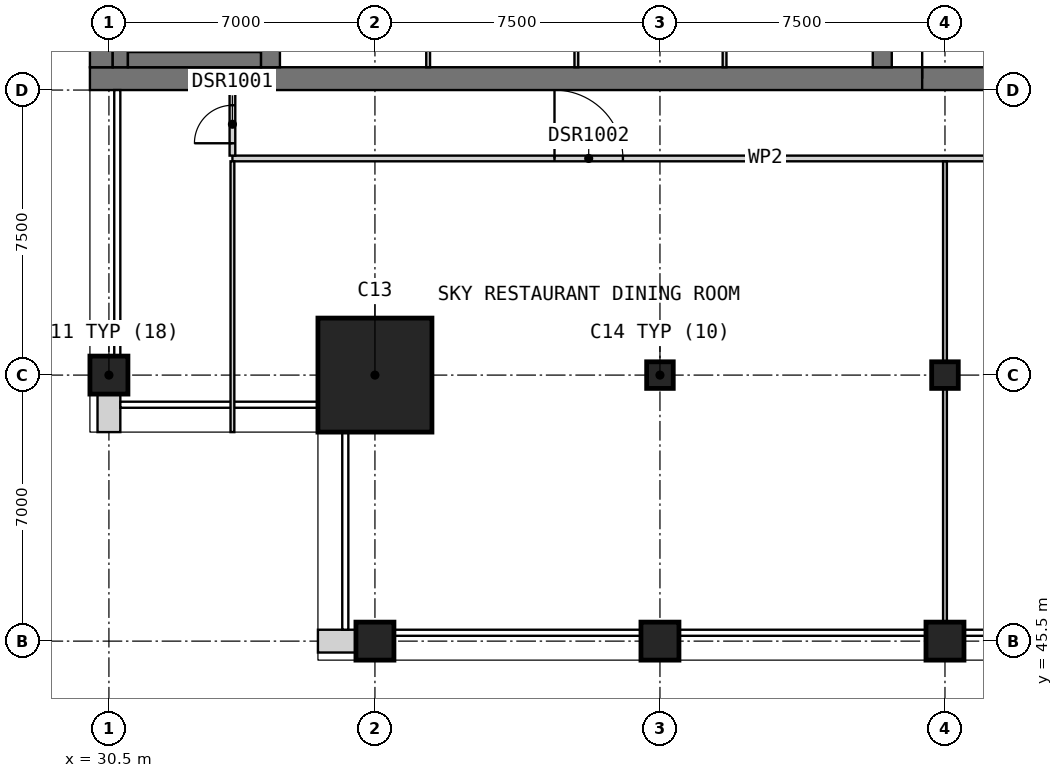
"""IFC4 building model, lengths in metres.
Left out: names, types, materials, properties, quantities, classifications, styles, units other than length and angle.
Written with IfcOpenShell. Run it as: python <this file> out.ifc"""

import sys

from ifc_helpers import new_model, si_unit, direction, frame, frame_2d, origin, origin_2d, place, context, subcontext, project, spatial, rectangle, extrude, element, fill, save


model = new_model("IFC4")
c1 = context("Model", 3, precision=1e-05, world=origin(), true_north=direction((0.0, 1.0)))
c2 = subcontext(c1, "Body", "Model", "MODEL_VIEW")
j1 = project(units=[si_unit("LENGTHUNIT", "METRE"), si_unit("PLANEANGLEUNIT", "RADIAN")], contexts=[c1])
p1 = place(None, origin())
s1 = spatial("IfcSite", under=j1, at=p1, CompositionType="ELEMENT")
p2 = place(p1, origin())
s2 = spatial("IfcBuilding", under=s1, at=p2, CompositionType="ELEMENT")
p3 = place(p2, frame((0.0, 0.0, 292.2)))
s3 = spatial("IfcBuildingStorey", under=s2, at=p3, CompositionType="ELEMENT", Elevation=292.2)
for number, where, z_axis, x_axis in (
    (1, (30.5, 52.5, 0.0), (0.0, 0.0, 1.0), (1.0, 0.0, 0.0)),
    (2, (37.5, 45.5, 0.0), (0.0, 0.0, 1.0), (1.0, 0.0, 0.0)),
    (3, (45.0, 45.5, 0.0), (0.0, 0.0, 1.0), (1.0, 0.0, 0.0)),
):
    element("IfcColumn", number, at=place(p3, frame(where, z_axis=z_axis, x_axis=x_axis)), inside=s3, PredefinedType="COLUMN", context=c2, shape_type="SweptSolid", body=[
        extrude(rectangle(XDim=1.0, YDim=1.0, at=origin_2d()), origin(), (0.0, 0.0, 1.0), 5.5),
    ])
p4 = place(p3, frame((45.0, 52.5, 0.0), z_axis=(0.0, 0.0, 1.0), x_axis=(1.0, 0.0, 0.0)))
e4 = element("IfcColumn", 4, at=p4, inside=s3, PredefinedType="COLUMN", context=c2, shape_type="SweptSolid", body=[
    extrude(rectangle(XDim=0.7, YDim=0.7, at=origin_2d()), origin(), (0.0, 0.0, 1.0), 5.5),
])
p5 = place(p3, frame((52.5, 45.5, 0.0), z_axis=(0.0, 0.0, 1.0), x_axis=(1.0, 0.0, 0.0)))
e5 = element("IfcColumn", 5, at=p5, inside=s3, PredefinedType="COLUMN", context=c2, shape_type="SweptSolid", body=[
    extrude(rectangle(XDim=1.0, YDim=1.0, at=origin_2d()), origin(), (0.0, 0.0, 1.0), 5.5),
])
p6 = place(p3, frame((52.5, 52.5, 0.0), z_axis=(0.0, 0.0, 1.0), x_axis=(1.0, 0.0, 0.0)))
e6 = element("IfcColumn", 6, at=p6, inside=s3, PredefinedType="COLUMN", context=c2, shape_type="SweptSolid", body=[
    extrude(rectangle(XDim=0.7, YDim=0.7, at=origin_2d()), origin(), (0.0, 0.0, 1.0), 5.5),
])
p7 = place(p3, frame((37.5, 52.5, 0.0), z_axis=(0.0, 0.0, 1.0), x_axis=(1.0, 0.0, 0.0)))
e7 = element("IfcColumn", 7, at=p7, inside=s3, PredefinedType="COLUMN", context=c2, shape_type="SweptSolid", body=[
    extrude(rectangle(XDim=3.0, YDim=3.0, at=origin_2d()), origin(), (0.0, 0.0, 1.0), 5.5),
])
p8 = place(p3, frame((30.0, 60.3, 0.0), z_axis=(0.0, 0.0, 1.0), x_axis=(1.0, 0.0, 0.0)))
e8 = element("IfcWall", 8, at=p8, inside=s3, PredefinedType="SHEAR", context=c2, shape_type="SweptSolid", body=[
    extrude(rectangle(XDim=30.0, YDim=0.6, at=frame_2d((15.0, 0.0))), origin(), (0.0, 0.0, 1.0), 5.5),
])
p9 = place(p8, frame((21.9, 0.0, 0.0)))
e9 = element("IfcOpeningElement", 9, at=p9, cuts=e8, PredefinedType="OPENING", context=c2, shape_type="SweptSolid", body=[
    extrude(rectangle(XDim=1.8, YDim=2.1, at=frame_2d((0.9, 1.05))), frame((0.0, 0.31, 0.0), z_axis=(0.0, -1.0, 0.0), x_axis=(1.0, 0.0, 0.0)), (0.0, 0.0, 1.0), 0.62),
])
p10 = place(p8, frame((26.5, 0.0, 0.0)))
e10 = element("IfcOpeningElement", 10, at=p10, cuts=e8, PredefinedType="OPENING", context=c2, shape_type="SweptSolid", body=[
    extrude(rectangle(XDim=1.2, YDim=2.1, at=frame_2d((0.6, 1.05))), frame((0.0, 0.31, 0.0), z_axis=(0.0, -1.0, 0.0), x_axis=(1.0, 0.0, 0.0)), (0.0, 0.0, 1.0), 0.62),
])
p11 = place(p3, frame((30.3, 60.6, 0.0), z_axis=(0.0, 0.0, 1.0), x_axis=(0.0, 1.0, 0.0)))
e11 = element("IfcWall", 11, at=p11, inside=s3, PredefinedType="SHEAR", context=c2, shape_type="SweptSolid", body=[
    extrude(rectangle(XDim=21.3, YDim=0.6, at=frame_2d((10.65, 0.0))), origin(), (0.0, 0.0, 1.0), 5.5),
])
for number, where, z_axis, x_axis in (
    (12, (34.75, 60.6, 0.0), (0.0, 0.0, 1.0), (0.0, 1.0, 0.0)),
    (13, (50.85, 60.6, 0.0), (0.0, 0.0, 1.0), (0.0, 1.0, 0.0)),
):
    element("IfcWall", number, at=place(p3, frame(where, z_axis=z_axis, x_axis=x_axis)), inside=s3, PredefinedType="SHEAR", context=c2, shape_type="SweptSolid", body=[
        extrude(rectangle(XDim=3.6, YDim=0.5, at=frame_2d((1.8, 0.0))), origin(), (0.0, 0.0, 1.0), 5.5),
    ])
for number, where, z_axis, x_axis in (
    (14, (36.0, 45.5, 0.0), (0.0, 0.0, 1.0), (1.0, 0.0, 0.0)),
    (15, (30.5, 52.0, 0.0), (0.0, 0.0, 1.0), (0.0, -1.0, 0.0)),
):
    element("IfcWall", number, at=place(p3, frame(where, z_axis=z_axis, x_axis=x_axis)), inside=s3, PredefinedType="SOLIDWALL", context=c2, shape_type="SweptSolid", body=[
        extrude(rectangle(XDim=1.0, YDim=0.6, at=frame_2d((0.5, 0.0))), origin(), (0.0, 0.0, 1.0), 5.2),
    ])
for number, where, z_axis, x_axis in (
    (16, (38.9, 60.6, 0.0), (0.0, 0.0, 1.0), (0.0, 1.0, 0.0)),
    (17, (42.8, 60.6, 0.0), (0.0, 0.0, 1.0), (0.0, 1.0, 0.0)),
    (18, (46.7, 60.6, 0.0), (0.0, 0.0, 1.0), (0.0, 1.0, 0.0)),
):
    element("IfcWall", number, at=place(p3, frame(where, z_axis=z_axis, x_axis=x_axis)), inside=s3, PredefinedType="PARTITIONING", context=c2, shape_type="SweptSolid", body=[
        extrude(rectangle(XDim=3.4, YDim=0.1, at=frame_2d((1.7, 0.0))), origin(), (0.0, 0.0, 1.0), 5.2),
    ])
p12 = place(p3, frame((30.8, 60.6, 0.0), z_axis=(0.0, 0.0, 1.0), x_axis=(0.0, 1.0, 0.0)))
e19 = element("IfcWall", 19, at=p12, inside=s3, PredefinedType="SOLIDWALL", context=c2, shape_type="SweptSolid", body=[
    extrude(rectangle(XDim=21.3, YDim=0.4, at=frame_2d((10.65, 0.0))), origin(), (0.0, 0.0, 1.0), 5.2),
])
p13 = place(p3, frame((31.0, 60.8, 0.0), z_axis=(0.0, 0.0, 1.0), x_axis=(1.0, 0.0, 0.0)))
e20 = element("IfcWall", 20, at=p13, inside=s3, PredefinedType="SOLIDWALL", context=c2, shape_type="SweptSolid", body=[
    extrude(rectangle(XDim=3.5, YDim=0.4, at=frame_2d((1.75, 0.0))), origin(), (0.0, 0.0, 1.0), 5.2),
])
p14 = place(p3, frame((33.75, 58.2, 0.0), z_axis=(0.0, 0.0, 1.0), x_axis=(1.0, 0.0, 0.0)))
e21 = element("IfcWall", 21, at=p14, inside=s3, PredefinedType="PARTITIONING", context=c2, shape_type="SweptSolid", body=[
    extrude(rectangle(XDim=28.05, YDim=0.15, at=frame_2d((14.025, 0.0))), origin(), (0.0, 0.0, 1.0), 5.2),
])
p15 = place(p14, frame((8.475, 0.0, 0.0)))
e22 = element("IfcOpeningElement", 22, at=p15, cuts=e21, PredefinedType="OPENING", context=c2, shape_type="SweptSolid", body=[
    extrude(rectangle(XDim=1.8, YDim=2.1, at=frame_2d((0.9, 1.05))), frame((0.0, 0.085, 0.0), z_axis=(0.0, -1.0, 0.0), x_axis=(1.0, 0.0, 0.0)), (0.0, 0.0, 1.0), 0.17),
])
p16 = place(p14, frame((22.0, 0.0, 0.0)))
e23 = element("IfcOpeningElement", 23, at=p16, cuts=e21, PredefinedType="OPENING", context=c2, shape_type="SweptSolid", body=[
    extrude(rectangle(XDim=1.0, YDim=2.1, at=frame_2d((0.5, 1.05))), frame((0.0, 0.085, 0.0), z_axis=(0.0, -1.0, 0.0), x_axis=(1.0, 0.0, 0.0)), (0.0, 0.0, 1.0), 0.17),
])
p17 = place(p14, frame((26.65, 0.0, 0.0)))
e24 = element("IfcOpeningElement", 24, at=p17, cuts=e21, PredefinedType="OPENING", context=c2, shape_type="SweptSolid", body=[
    extrude(rectangle(XDim=1.0, YDim=2.1, at=frame_2d((0.5, 1.05))), frame((0.0, 0.085, 0.0), z_axis=(0.0, -1.0, 0.0), x_axis=(1.0, 0.0, 0.0)), (0.0, 0.0, 1.0), 0.17),
])
p18 = place(p3, frame((33.75, 58.275, 0.0), z_axis=(0.0, 0.0, 1.0), x_axis=(0.0, 1.0, 0.0)))
e25 = element("IfcWall", 25, at=p18, inside=s3, PredefinedType="PARTITIONING", context=c2, shape_type="SweptSolid", body=[
    extrude(rectangle(XDim=1.725, YDim=0.15, at=frame_2d((0.863, 0.0))), origin(), (0.0, 0.0, 1.0), 5.2),
])
p19 = place(p18, frame((0.325, 0.0, 0.0)))
e26 = element("IfcOpeningElement", 26, at=p19, cuts=e25, PredefinedType="OPENING", context=c2, shape_type="SweptSolid", body=[
    extrude(rectangle(XDim=1.0, YDim=2.1, at=frame_2d((0.5, 1.05))), frame((0.0, 0.085, 0.0), z_axis=(0.0, -1.0, 0.0), x_axis=(1.0, 0.0, 0.0)), (0.0, 0.0, 1.0), 0.17),
])
p20 = place(p3, frame((33.75, 51.0, 0.0), z_axis=(0.0, 0.0, 1.0), x_axis=(0.0, 1.0, 0.0)))
e27 = element("IfcWall", 27, at=p20, inside=s3, PredefinedType="PARTITIONING", context=c2, shape_type="SweptSolid", body=[
    extrude(rectangle(XDim=7.125, YDim=0.1, at=frame_2d((3.562, 0.0))), origin(), (0.0, 0.0, 1.0), 5.2),
])
p21 = place(p3, frame((52.5, 45.0, 0.0), z_axis=(0.0, 0.0, 1.0), x_axis=(0.0, 1.0, 0.0)))
e28 = element("IfcWall", 28, at=p21, inside=s3, PredefinedType="PARTITIONING", context=c2, shape_type="SweptSolid", body=[
    extrude(rectangle(XDim=13.125, YDim=0.1, at=frame_2d((6.562, 0.0))), origin(), (0.0, 0.0, 1.0), 5.2),
])
p22 = place(p9, origin())
e29 = element("IfcDoor", 29, at=p22, inside=s3, OperationType="DOUBLE_DOOR_SINGLE_SWING", PredefinedType="DOOR", context=c2, shape_type="SweptSolid", body=[
    extrude(rectangle(XDim=1.8, YDim=2.1, at=frame_2d((0.9, 1.05))), frame((0.0, 0.025, 0.0), z_axis=(0.0, -1.0, 0.0), x_axis=(1.0, 0.0, 0.0)), (0.0, 0.0, 1.0), 0.05),
])
fill(e9, e29)
p23 = place(p19, origin())
e30 = element("IfcDoor", 30, at=p23, inside=s3, OperationType="SINGLE_SWING_RIGHT", PredefinedType="DOOR", context=c2, shape_type="SweptSolid", body=[
    extrude(rectangle(XDim=1.0, YDim=2.1, at=frame_2d((0.5, 1.05))), frame((0.0, 0.025, 0.0), z_axis=(0.0, -1.0, 0.0), x_axis=(1.0, 0.0, 0.0)), (0.0, 0.0, 1.0), 0.05),
])
fill(e26, e30)
p24 = place(p15, origin())
e31 = element("IfcDoor", 31, at=p24, inside=s3, OperationType="DOUBLE_DOOR_SINGLE_SWING", PredefinedType="DOOR", context=c2, shape_type="SweptSolid", body=[
    extrude(rectangle(XDim=1.8, YDim=2.1, at=frame_2d((0.9, 1.05))), frame((0.0, 0.025, 0.0), z_axis=(0.0, -1.0, 0.0), x_axis=(1.0, 0.0, 0.0)), (0.0, 0.0, 1.0), 0.05),
])
fill(e22, e31)
save(model, sys.argv[1])
